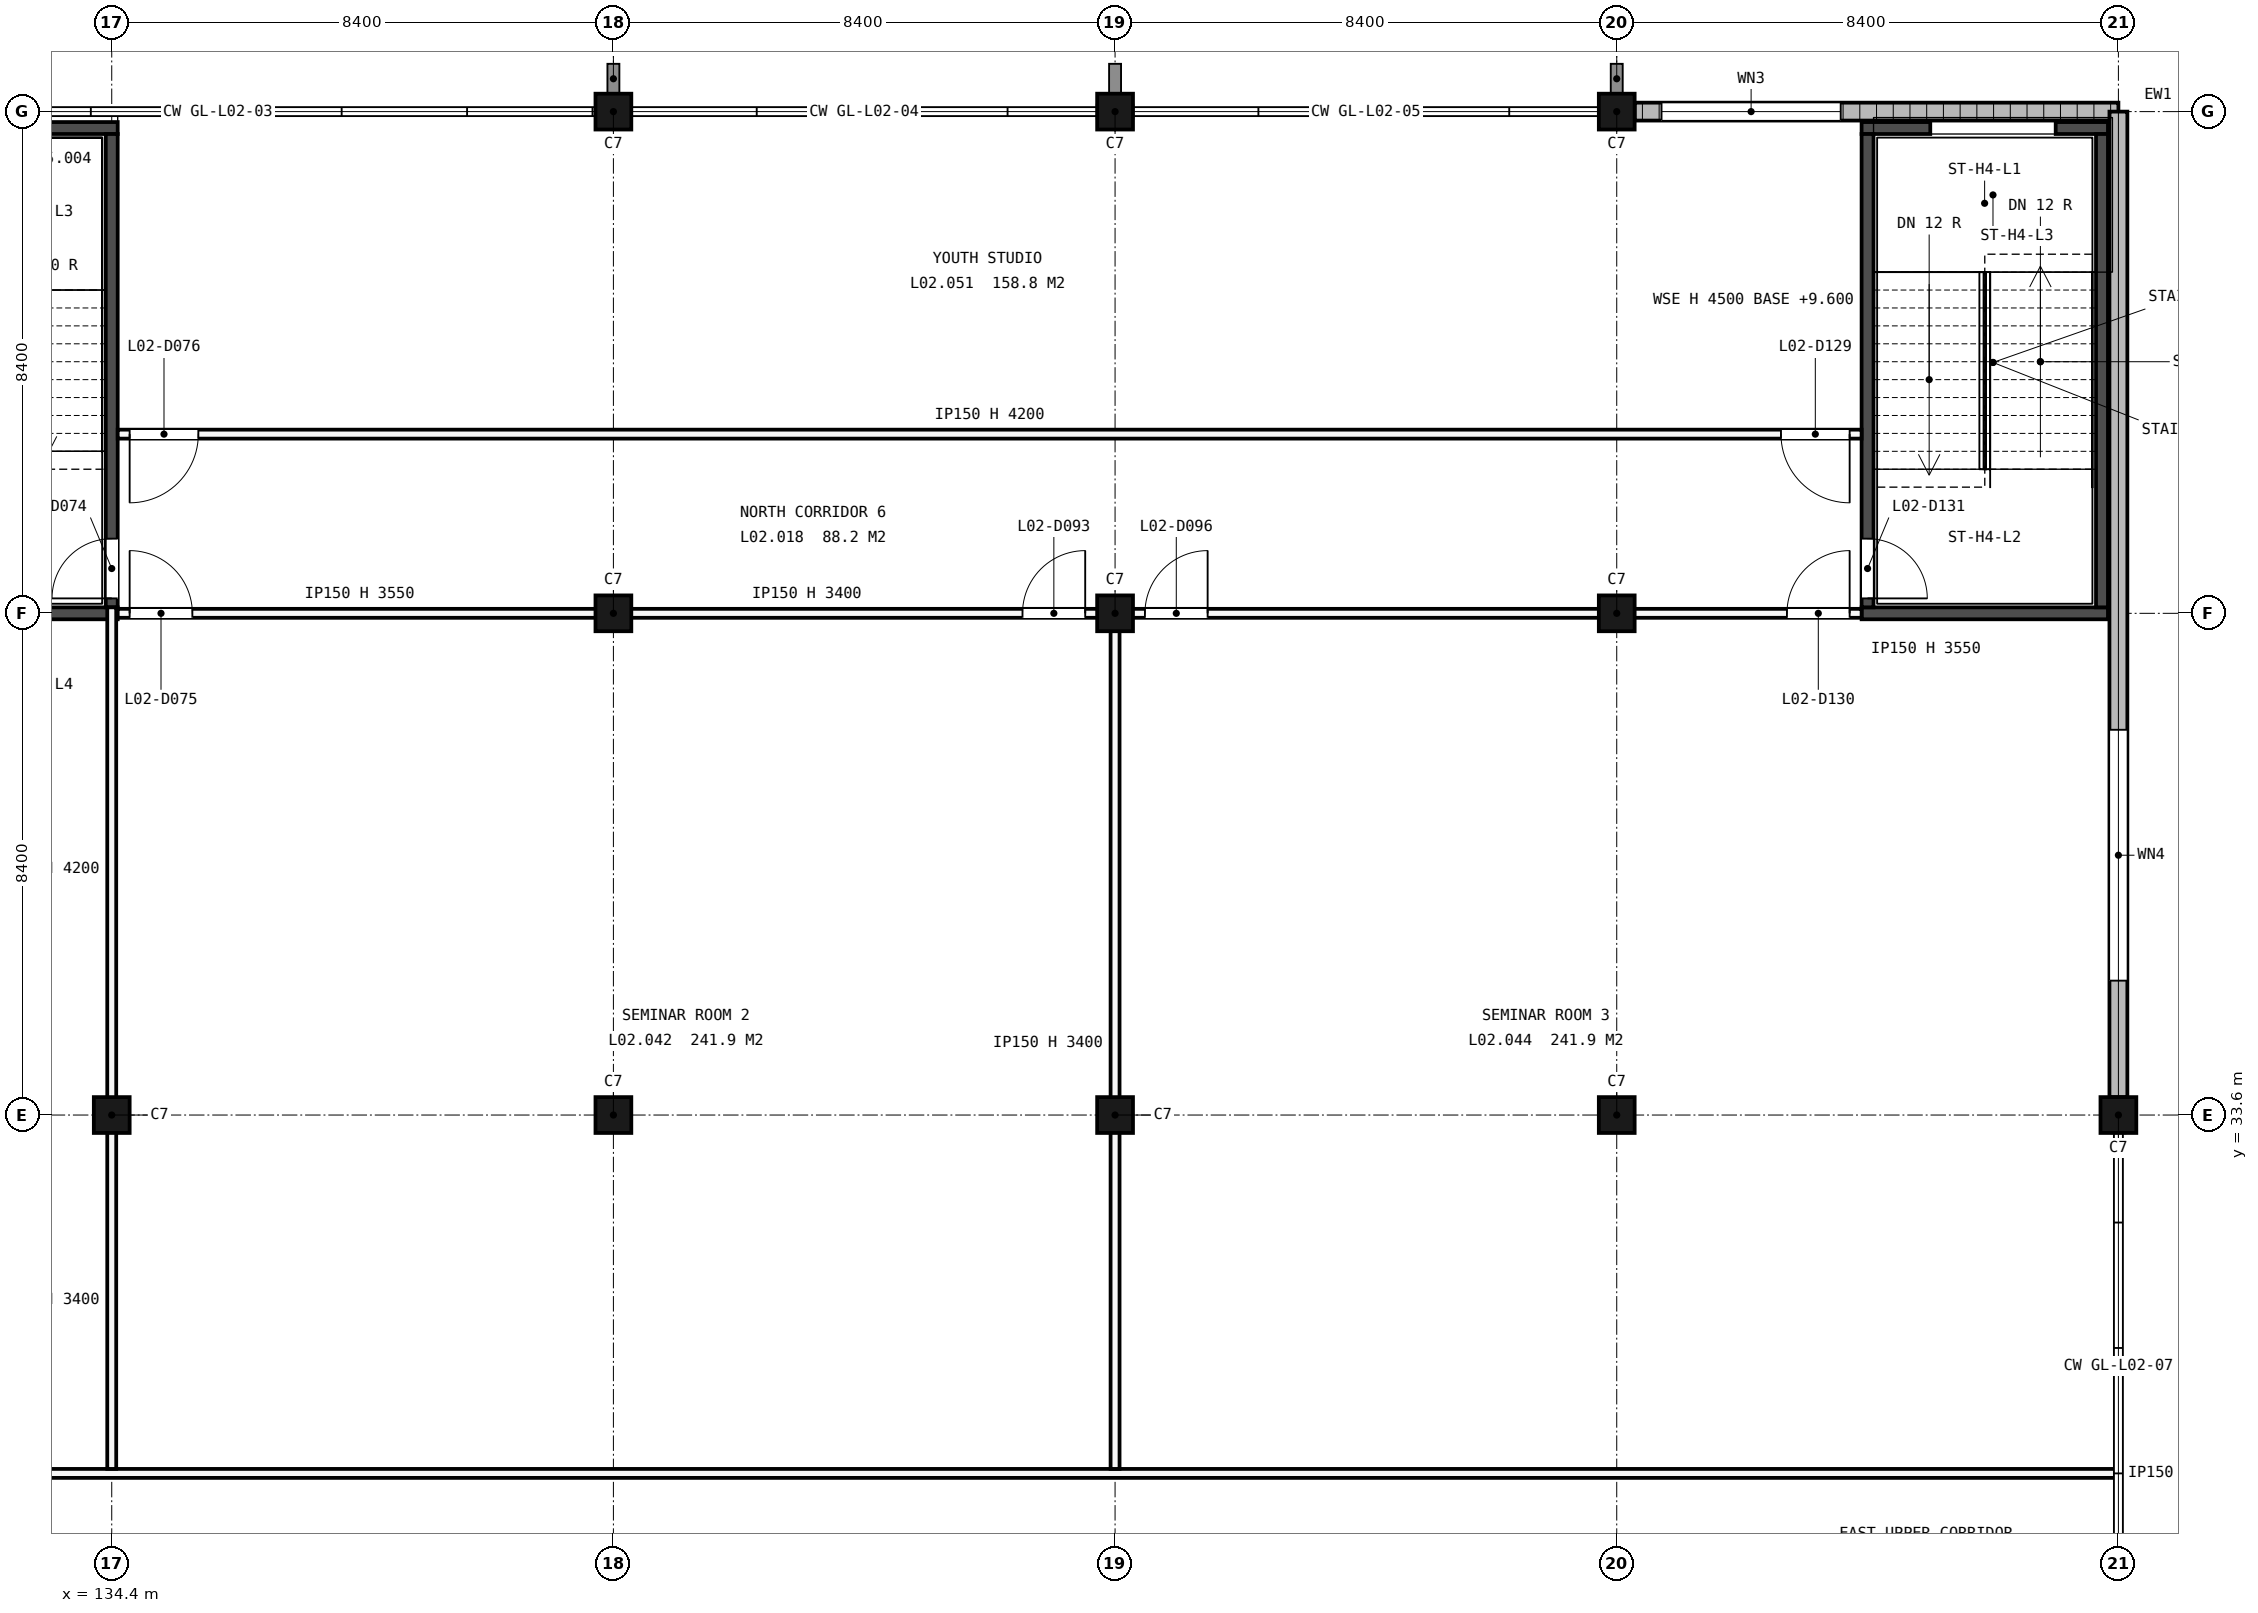
"""IFC4 building model, lengths in metres.
Left out: names, types, materials, properties, quantities, classifications, styles, units other than length and angle.
Written with IfcOpenShell. Run it as: python <this file> out.ifc"""

import sys

from ifc_helpers import new_model, si_unit, direction, frame, frame_2d, origin, origin_2d, place, context, subcontext, project, spatial, rectangle, extrude, element, fill, save


model = new_model("IFC4")
c1 = context("Model", 3, precision=1e-05, world=origin(), true_north=direction((0.0, 1.0)))
c2 = subcontext(c1, "Body", "Model", "MODEL_VIEW")
j1 = project(units=[si_unit("LENGTHUNIT", "METRE"), si_unit("PLANEANGLEUNIT", "RADIAN")], contexts=[c1])
p1 = place(None, origin())
s1 = spatial("IfcSite", under=j1, at=p1, CompositionType="ELEMENT")
p2 = place(p1, origin())
s2 = spatial("IfcBuilding", under=s1, at=p2, CompositionType="ELEMENT")
p3 = place(p2, frame((0.0, 0.0, 9.9)))
s3 = spatial("IfcBuildingStorey", under=s2, at=p3, CompositionType="ELEMENT", Elevation=9.9)
for number, where, z_axis, x_axis in (
    (1, (134.4, 33.6, -0.25), (0.0, 0.0, 1.0), (1.0, 0.0, 0.0)),
    (2, (142.8, 33.6, -0.25), (0.0, 0.0, 1.0), (1.0, 0.0, 0.0)),
    (3, (142.8, 42.0, -0.25), (0.0, 0.0, 1.0), (1.0, 0.0, 0.0)),
    (4, (142.8, 50.4, -0.25), (0.0, 0.0, 1.0), (1.0, 0.0, 0.0)),
    (5, (151.2, 33.6, -0.25), (0.0, 0.0, 1.0), (1.0, 0.0, 0.0)),
    (6, (151.2, 42.0, -0.25), (0.0, 0.0, 1.0), (1.0, 0.0, 0.0)),
    (7, (151.2, 50.4, -0.25), (0.0, 0.0, 1.0), (1.0, 0.0, 0.0)),
    (8, (159.6, 33.6, -0.25), (0.0, 0.0, 1.0), (1.0, 0.0, 0.0)),
    (9, (159.6, 42.0, -0.25), (0.0, 0.0, 1.0), (1.0, 0.0, 0.0)),
    (10, (159.6, 50.4, -0.25), (0.0, 0.0, 1.0), (1.0, 0.0, 0.0)),
    (11, (168.0, 33.6, -0.25), (0.0, 0.0, 1.0), (1.0, 0.0, 0.0)),
):
    element("IfcColumn", number, at=place(p3, frame(where, z_axis=z_axis, x_axis=x_axis)), inside=s3, PredefinedType="COLUMN", context=c2, shape_type="SweptSolid", body=[
        extrude(rectangle(XDim=0.6, YDim=0.6, at=origin_2d()), origin(), (0.0, 0.0, 1.0), 4.45),
    ])
p4 = place(p3, frame((159.9, 50.4, 0.0), z_axis=(0.0, 0.0, 1.0), x_axis=(1.0, 0.0, 0.0)))
e12 = element("IfcWall", 12, at=p4, inside=s3, PredefinedType="STANDARD", context=c2, shape_type="SweptSolid", body=[
    extrude(rectangle(XDim=8.1, YDim=0.3, at=frame_2d((4.05, 0.0))), origin(), (0.0, 0.0, 1.0), 3.55),
])
p5 = place(p4, frame((0.45, 0.0, 0.9)))
e13 = element("IfcOpeningElement", 13, at=p5, cuts=e12, PredefinedType="OPENING", context=c2, shape_type="SweptSolid", body=[
    extrude(rectangle(XDim=3.0, YDim=1.5, at=frame_2d((1.5, 0.75))), frame((0.0, 0.16, 0.0), z_axis=(0.0, -1.0, 0.0), x_axis=(1.0, 0.0, 0.0)), (0.0, 0.0, 1.0), 0.32),
])
p6 = place(p3, frame((168.0, 33.9, 0.0), z_axis=(0.0, 0.0, 1.0), x_axis=(0.0, 1.0, 0.0)))
e14 = element("IfcWall", 14, at=p6, inside=s3, PredefinedType="STANDARD", context=c2, shape_type="SweptSolid", body=[
    extrude(rectangle(XDim=16.5, YDim=0.3, at=frame_2d((8.25, 0.0))), origin(), (0.0, 0.0, 1.0), 3.55),
])
p7 = place(p6, frame((1.95, 0.0, 0.9)))
e15 = element("IfcOpeningElement", 15, at=p7, cuts=e14, PredefinedType="OPENING", context=c2, shape_type="SweptSolid", body=[
    extrude(rectangle(XDim=4.2, YDim=1.5, at=frame_2d((2.1, 0.75))), frame((0.0, 0.16, 0.0), z_axis=(0.0, -1.0, 0.0), x_axis=(1.0, 0.0, 0.0)), (0.0, 0.0, 1.0), 0.32),
])
for number, where, z_axis, x_axis in (
    (16, (130.1, 42.0, -0.3), (0.0, 0.0, 1.0), (1.0, 0.0, 0.0)),
    (17, (130.1, 50.125, -0.3), (0.0, 0.0, 1.0), (1.0, 0.0, 0.0)),
):
    element("IfcWall", number, at=place(p3, frame(where, z_axis=z_axis, x_axis=x_axis)), inside=s3, PredefinedType="SHEAR", context=c2, shape_type="SweptSolid", body=[
        extrude(rectangle(XDim=4.4, YDim=0.2, at=frame_2d((2.2, 0.0))), origin(), (0.0, 0.0, 1.0), 4.5),
    ])
p8 = place(p3, frame((134.4, 42.1, -0.3), z_axis=(0.0, 0.0, 1.0), x_axis=(0.0, 1.0, 0.0)))
e18 = element("IfcWall", 18, at=p8, inside=s3, PredefinedType="SHEAR", context=c2, shape_type="SweptSolid", body=[
    extrude(rectangle(XDim=7.925, YDim=0.2, at=frame_2d((3.962, 0.0))), origin(), (0.0, 0.0, 1.0), 4.5),
])
p9 = place(p8, frame((0.15, 0.0, 0.3)))
e19 = element("IfcOpeningElement", 19, at=p9, cuts=e18, PredefinedType="OPENING", context=c2, shape_type="SweptSolid", body=[
    extrude(rectangle(XDim=1.0, YDim=2.1, at=frame_2d((0.5, 1.05))), frame((0.0, 0.11, 0.0), z_axis=(0.0, -1.0, 0.0), x_axis=(1.0, 0.0, 0.0)), (0.0, 0.0, 1.0), 0.22),
])
p10 = place(p3, frame((163.7, 42.0, -0.3), z_axis=(0.0, 0.0, 1.0), x_axis=(1.0, 0.0, 0.0)))
e20 = element("IfcWall", 20, at=p10, inside=s3, PredefinedType="SHEAR", context=c2, shape_type="SweptSolid", body=[
    extrude(rectangle(XDim=4.125, YDim=0.2, at=frame_2d((2.062, 0.0))), origin(), (0.0, 0.0, 1.0), 4.5),
])
p11 = place(p3, frame((163.7, 50.125, -0.3), z_axis=(0.0, 0.0, 1.0), x_axis=(1.0, 0.0, 0.0)))
e21 = element("IfcWall", 21, at=p11, inside=s3, PredefinedType="SHEAR", context=c2, shape_type="SweptSolid", body=[
    extrude(rectangle(XDim=1.15, YDim=0.2, at=frame_2d((0.575, 0.0))), origin(), (0.0, 0.0, 1.0), 4.5),
])
p12 = place(p3, frame((166.95, 50.125, -0.3), z_axis=(0.0, 0.0, 1.0), x_axis=(1.0, 0.0, 0.0)))
e22 = element("IfcWall", 22, at=p12, inside=s3, PredefinedType="SHEAR", context=c2, shape_type="SweptSolid", body=[
    extrude(rectangle(XDim=0.875, YDim=0.2, at=frame_2d((0.438, 0.0))), origin(), (0.0, 0.0, 1.0), 4.5),
])
p13 = place(p3, frame((163.8, 42.1, -0.3), z_axis=(0.0, 0.0, 1.0), x_axis=(0.0, 1.0, 0.0)))
e23 = element("IfcWall", 23, at=p13, inside=s3, PredefinedType="SHEAR", context=c2, shape_type="SweptSolid", body=[
    extrude(rectangle(XDim=7.925, YDim=0.2, at=frame_2d((3.962, 0.0))), origin(), (0.0, 0.0, 1.0), 4.5),
])
p14 = place(p13, frame((0.15, 0.0, 0.3)))
e24 = element("IfcOpeningElement", 24, at=p14, cuts=e23, PredefinedType="OPENING", context=c2, shape_type="SweptSolid", body=[
    extrude(rectangle(XDim=1.0, YDim=2.1, at=frame_2d((0.5, 1.05))), frame((0.0, 0.11, 0.0), z_axis=(0.0, -1.0, 0.0), x_axis=(1.0, 0.0, 0.0)), (0.0, 0.0, 1.0), 0.22),
])
p15 = place(p3, frame((167.725, 42.1, -0.3), z_axis=(0.0, 0.0, 1.0), x_axis=(0.0, 1.0, 0.0)))
e25 = element("IfcWall", 25, at=p15, inside=s3, PredefinedType="SHEAR", context=c2, shape_type="SweptSolid", body=[
    extrude(rectangle(XDim=7.925, YDim=0.2, at=frame_2d((3.962, 0.0))), origin(), (0.0, 0.0, 1.0), 4.5),
])
p16 = place(p3, frame((117.675, 27.6, 0.0), z_axis=(0.0, 0.0, 1.0), x_axis=(1.0, 0.0, 0.0)))
e26 = element("IfcWall", 26, at=p16, inside=s3, PredefinedType="PARTITIONING", context=c2, shape_type="SweptSolid", body=[
    extrude(rectangle(XDim=50.325, YDim=0.15, at=frame_2d((25.163, 0.0))), origin(), (0.0, 0.0, 1.0), 4.2),
])
p17 = place(p3, frame((134.5, 42.0, 0.0), z_axis=(0.0, 0.0, 1.0), x_axis=(1.0, 0.0, 0.0)))
e27 = element("IfcWall", 27, at=p17, inside=s3, PredefinedType="PARTITIONING", context=c2, shape_type="SweptSolid", body=[
    extrude(rectangle(XDim=8.1, YDim=0.15, at=frame_2d((4.05, 0.0))), origin(), (0.0, 0.0, 1.0), 3.55),
])
p18 = place(p17, frame((0.2, 0.0, 0.0)))
e28 = element("IfcOpeningElement", 28, at=p18, cuts=e27, PredefinedType="OPENING", context=c2, shape_type="SweptSolid", body=[
    extrude(rectangle(XDim=1.05, YDim=2.1, at=frame_2d((0.525, 1.05))), frame((0.0, 0.085, 0.0), z_axis=(0.0, -1.0, 0.0), x_axis=(1.0, 0.0, 0.0)), (0.0, 0.0, 1.0), 0.17),
])
p19 = place(p3, frame((142.6, 42.0, 0.0), z_axis=(0.0, 0.0, 1.0), x_axis=(1.0, 0.0, 0.0)))
e29 = element("IfcWall", 29, at=p19, inside=s3, PredefinedType="PARTITIONING", context=c2, shape_type="SweptSolid", body=[
    extrude(rectangle(XDim=17.2, YDim=0.15, at=frame_2d((8.6, 0.0))), origin(), (0.0, 0.0, 1.0), 3.4),
])
p20 = place(p19, frame((7.05, 0.0, 0.0)))
e30 = element("IfcOpeningElement", 30, at=p20, cuts=e29, PredefinedType="OPENING", context=c2, shape_type="SweptSolid", body=[
    extrude(rectangle(XDim=1.05, YDim=2.1, at=frame_2d((0.525, 1.05))), frame((0.0, 0.085, 0.0), z_axis=(0.0, -1.0, 0.0), x_axis=(1.0, 0.0, 0.0)), (0.0, 0.0, 1.0), 0.17),
])
p21 = place(p19, frame((9.1, 0.0, 0.0)))
e31 = element("IfcOpeningElement", 31, at=p21, cuts=e29, PredefinedType="OPENING", context=c2, shape_type="SweptSolid", body=[
    extrude(rectangle(XDim=1.05, YDim=2.1, at=frame_2d((0.525, 1.05))), frame((0.0, 0.085, 0.0), z_axis=(0.0, -1.0, 0.0), x_axis=(1.0, 0.0, 0.0)), (0.0, 0.0, 1.0), 0.17),
])
p22 = place(p3, frame((159.8, 42.0, 0.0), z_axis=(0.0, 0.0, 1.0), x_axis=(1.0, 0.0, 0.0)))
e32 = element("IfcWall", 32, at=p22, inside=s3, PredefinedType="PARTITIONING", context=c2, shape_type="SweptSolid", body=[
    extrude(rectangle(XDim=3.9, YDim=0.15, at=frame_2d((1.95, 0.0))), origin(), (0.0, 0.0, 1.0), 3.55),
])
p23 = place(p22, frame((2.65, 0.0, 0.0)))
e33 = element("IfcOpeningElement", 33, at=p23, cuts=e32, PredefinedType="OPENING", context=c2, shape_type="SweptSolid", body=[
    extrude(rectangle(XDim=1.05, YDim=2.1, at=frame_2d((0.525, 1.05))), frame((0.0, 0.085, 0.0), z_axis=(0.0, -1.0, 0.0), x_axis=(1.0, 0.0, 0.0)), (0.0, 0.0, 1.0), 0.17),
])
p24 = place(p3, frame((134.5, 45.0, 0.0), z_axis=(0.0, 0.0, 1.0), x_axis=(1.0, 0.0, 0.0)))
e34 = element("IfcWall", 34, at=p24, inside=s3, PredefinedType="PARTITIONING", context=c2, shape_type="SweptSolid", body=[
    extrude(rectangle(XDim=29.2, YDim=0.15, at=frame_2d((14.6, 0.0))), origin(), (0.0, 0.0, 1.0), 4.2),
])
p25 = place(p24, frame((0.2, 0.0, 0.0)))
e35 = element("IfcOpeningElement", 35, at=p25, cuts=e34, PredefinedType="OPENING", context=c2, shape_type="SweptSolid", body=[
    extrude(rectangle(XDim=1.15, YDim=2.1, at=frame_2d((0.575, 1.05))), frame((0.0, 0.085, 0.0), z_axis=(0.0, -1.0, 0.0), x_axis=(1.0, 0.0, 0.0)), (0.0, 0.0, 1.0), 0.17),
])
p26 = place(p24, frame((27.85, 0.0, 0.0)))
e36 = element("IfcOpeningElement", 36, at=p26, cuts=e34, PredefinedType="OPENING", context=c2, shape_type="SweptSolid", body=[
    extrude(rectangle(XDim=1.15, YDim=2.1, at=frame_2d((0.575, 1.05))), frame((0.0, 0.085, 0.0), z_axis=(0.0, -1.0, 0.0), x_axis=(1.0, 0.0, 0.0)), (0.0, 0.0, 1.0), 0.17),
])
p27 = place(p3, frame((134.4, 27.675, 0.0), z_axis=(0.0, 0.0, 1.0), x_axis=(0.0, 1.0, 0.0)))
e37 = element("IfcWall", 37, at=p27, inside=s3, PredefinedType="PARTITIONING", context=c2, shape_type="SweptSolid", body=[
    extrude(rectangle(XDim=5.645, YDim=0.15, at=frame_2d((2.823, 0.0))), origin(), (0.0, 0.0, 1.0), 3.4),
])
p28 = place(p3, frame((134.4, 33.32, 0.0), z_axis=(0.0, 0.0, 1.0), x_axis=(0.0, 1.0, 0.0)))
e38 = element("IfcWall", 38, at=p28, inside=s3, PredefinedType="PARTITIONING", context=c2, shape_type="SweptSolid", body=[
    extrude(rectangle(XDim=8.78, YDim=0.15, at=frame_2d((4.39, 0.0))), origin(), (0.0, 0.0, 1.0), 4.2),
])
p29 = place(p3, frame((151.2, 27.675, 0.0), z_axis=(0.0, 0.0, 1.0), x_axis=(0.0, 1.0, 0.0)))
e39 = element("IfcWall", 39, at=p29, inside=s3, PredefinedType="PARTITIONING", context=c2, shape_type="SweptSolid", body=[
    extrude(rectangle(XDim=14.25, YDim=0.15, at=frame_2d((7.125, 0.0))), origin(), (0.0, 0.0, 1.0), 3.4),
])
p30 = place(p5, origin())
e40 = element("IfcWindow", 40, at=p30, inside=s3, PartitioningType="SINGLE_PANEL", PredefinedType="WINDOW", context=c2, shape_type="SweptSolid", body=[
    extrude(rectangle(XDim=3.0, YDim=1.5, at=frame_2d((1.5, 0.75))), frame((0.0, 0.03, 0.0), z_axis=(0.0, -1.0, 0.0), x_axis=(1.0, 0.0, 0.0)), (0.0, 0.0, 1.0), 0.06),
])
fill(e13, e40)
p31 = place(p7, origin())
e41 = element("IfcWindow", 41, at=p31, inside=s3, PartitioningType="SINGLE_PANEL", PredefinedType="WINDOW", context=c2, shape_type="SweptSolid", body=[
    extrude(rectangle(XDim=4.2, YDim=1.5, at=frame_2d((2.1, 0.75))), frame((0.0, 0.03, 0.0), z_axis=(0.0, -1.0, 0.0), x_axis=(1.0, 0.0, 0.0)), (0.0, 0.0, 1.0), 0.06),
])
fill(e15, e41)
p32 = place(p9, origin())
e42 = element("IfcDoor", 42, at=p32, inside=s3, OperationType="SINGLE_SWING_RIGHT", PredefinedType="DOOR", context=c2, shape_type="SweptSolid", body=[
    extrude(rectangle(XDim=1.0, YDim=2.1, at=frame_2d((0.5, 1.05))), frame((0.0, 0.025, 0.0), z_axis=(0.0, -1.0, 0.0), x_axis=(1.0, 0.0, 0.0)), (0.0, 0.0, 1.0), 0.05),
])
fill(e19, e42)
p33 = place(p14, origin())
e43 = element("IfcDoor", 43, at=p33, inside=s3, OperationType="SINGLE_SWING_LEFT", PredefinedType="DOOR", context=c2, shape_type="SweptSolid", body=[
    extrude(rectangle(XDim=1.0, YDim=2.1, at=frame_2d((0.5, 1.05))), frame((0.0, 0.025, 0.0), z_axis=(0.0, -1.0, 0.0), x_axis=(1.0, 0.0, 0.0)), (0.0, 0.0, 1.0), 0.05),
])
fill(e24, e43)
p34 = place(p18, origin())
e44 = element("IfcDoor", 44, at=p34, inside=s3, OperationType="SINGLE_SWING_RIGHT", PredefinedType="DOOR", context=c2, shape_type="SweptSolid", body=[
    extrude(rectangle(XDim=1.05, YDim=2.1, at=frame_2d((0.525, 1.05))), frame((0.0, 0.025, 0.0), z_axis=(0.0, -1.0, 0.0), x_axis=(1.0, 0.0, 0.0)), (0.0, 0.0, 1.0), 0.05),
])
fill(e28, e44)
p35 = place(p20, origin())
e45 = element("IfcDoor", 45, at=p35, inside=s3, OperationType="SINGLE_SWING_LEFT", PredefinedType="DOOR", context=c2, shape_type="SweptSolid", body=[
    extrude(rectangle(XDim=1.05, YDim=2.1, at=frame_2d((0.525, 1.05))), frame((0.0, 0.025, 0.0), z_axis=(0.0, -1.0, 0.0), x_axis=(1.0, 0.0, 0.0)), (0.0, 0.0, 1.0), 0.05),
])
fill(e30, e45)
p36 = place(p21, origin())
e46 = element("IfcDoor", 46, at=p36, inside=s3, OperationType="SINGLE_SWING_LEFT", PredefinedType="DOOR", context=c2, shape_type="SweptSolid", body=[
    extrude(rectangle(XDim=1.05, YDim=2.1, at=frame_2d((0.525, 1.05))), frame((0.0, 0.025, 0.0), z_axis=(0.0, -1.0, 0.0), x_axis=(1.0, 0.0, 0.0)), (0.0, 0.0, 1.0), 0.05),
])
fill(e31, e46)
p37 = place(p23, origin())
e47 = element("IfcDoor", 47, at=p37, inside=s3, OperationType="SINGLE_SWING_LEFT", PredefinedType="DOOR", context=c2, shape_type="SweptSolid", body=[
    extrude(rectangle(XDim=1.05, YDim=2.1, at=frame_2d((0.525, 1.05))), frame((0.0, 0.025, 0.0), z_axis=(0.0, -1.0, 0.0), x_axis=(1.0, 0.0, 0.0)), (0.0, 0.0, 1.0), 0.05),
])
fill(e33, e47)
p38 = place(p25, origin())
e48 = element("IfcDoor", 48, at=p38, inside=s3, OperationType="SINGLE_SWING_LEFT", PredefinedType="DOOR", context=c2, shape_type="SweptSolid", body=[
    extrude(rectangle(XDim=1.15, YDim=2.1, at=frame_2d((0.575, 1.05))), frame((0.0, 0.025, 0.0), z_axis=(0.0, -1.0, 0.0), x_axis=(1.0, 0.0, 0.0)), (0.0, 0.0, 1.0), 0.05),
])
fill(e35, e48)
p39 = place(p26, origin())
e49 = element("IfcDoor", 49, at=p39, inside=s3, OperationType="SINGLE_SWING_RIGHT", PredefinedType="DOOR", context=c2, shape_type="SweptSolid", body=[
    extrude(rectangle(XDim=1.15, YDim=2.1, at=frame_2d((0.575, 1.05))), frame((0.0, 0.025, 0.0), z_axis=(0.0, -1.0, 0.0), x_axis=(1.0, 0.0, 0.0)), (0.0, 0.0, 1.0), 0.05),
])
fill(e36, e49)
save(model, sys.argv[1])
